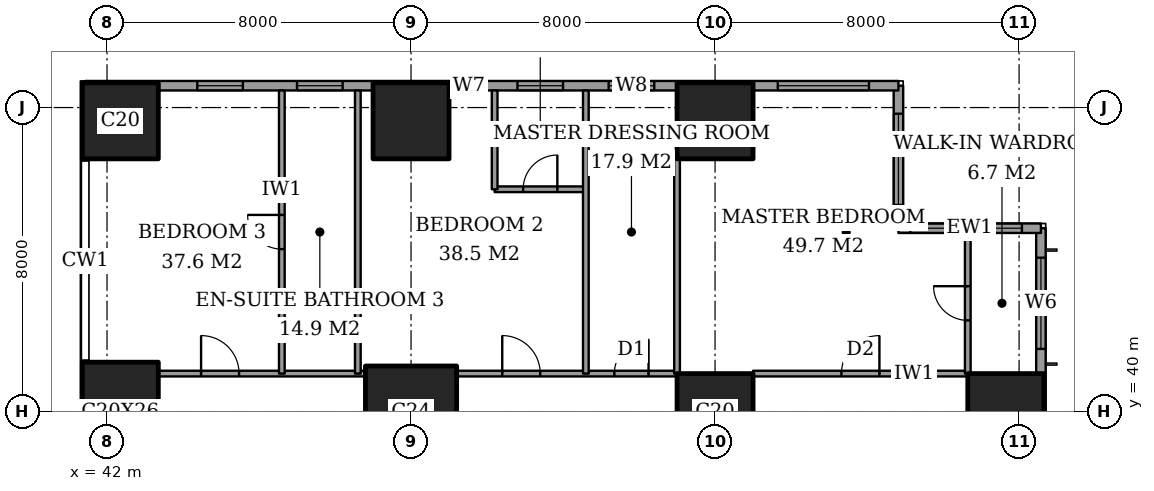
"""IFC4 building model, lengths in metres.
Left out: names, types, materials, properties, quantities, classifications, styles, units other than length and angle.
Written with IfcOpenShell. Run it as: python <this file> out.ifc"""

import sys

from ifc_helpers import new_model, si_unit, direction, frame, frame_2d, origin, origin_2d, place, context, subcontext, project, spatial, rectangle, extrude, element, fill, save


model = new_model("IFC4")
c1 = context("Model", 3, precision=1e-05, world=origin(), true_north=direction((0.0, 1.0)))
c2 = subcontext(c1, "Body", "Model", "MODEL_VIEW")
j1 = project(units=[si_unit("LENGTHUNIT", "METRE"), si_unit("PLANEANGLEUNIT", "RADIAN")], contexts=[c1])
p1 = place(None, origin())
s1 = spatial("IfcSite", under=j1, at=p1, CompositionType="ELEMENT")
p2 = place(p1, origin())
s2 = spatial("IfcBuilding", under=s1, at=p2, CompositionType="ELEMENT")
p3 = place(p2, frame((0.0, 0.0, 80.0)))
s3 = spatial("IfcBuildingStorey", under=s2, at=p3, CompositionType="ELEMENT", Elevation=80.0)
p4 = place(p3, frame((42.35, 40.0, 0.0), z_axis=(0.0, 0.0, 1.0), x_axis=(1.0, 0.0, 0.0)))
e1 = element("IfcColumn", 1, at=p4, inside=s3, PredefinedType="COLUMN", context=c2, shape_type="SweptSolid", body=[
    extrude(rectangle(XDim=2.0, YDim=2.6, at=origin_2d()), origin(), (0.0, 0.0, 1.0), 3.6),
])
p5 = place(p3, frame((42.35, 47.65, 0.0), z_axis=(0.0, 0.0, 1.0), x_axis=(1.0, 0.0, 0.0)))
e2 = element("IfcColumn", 2, at=p5, inside=s3, PredefinedType="COLUMN", context=c2, shape_type="SweptSolid", body=[
    extrude(rectangle(XDim=2.0, YDim=2.0, at=origin_2d()), origin(), (0.0, 0.0, 1.0), 3.6),
])
p6 = place(p3, frame((50.0, 40.0, 0.0), z_axis=(0.0, 0.0, 1.0), x_axis=(1.0, 0.0, 0.0)))
e3 = element("IfcColumn", 3, at=p6, inside=s3, PredefinedType="COLUMN", context=c2, shape_type="SweptSolid", body=[
    extrude(rectangle(XDim=2.4, YDim=2.4, at=origin_2d()), origin(), (0.0, 0.0, 1.0), 3.6),
])
for number, where, z_axis, x_axis in (
    (4, (50.0, 47.65, 0.0), (0.0, 0.0, 1.0), (1.0, 0.0, 0.0)),
    (5, (58.0, 40.0, 0.0), (0.0, 0.0, 1.0), (1.0, 0.0, 0.0)),
    (6, (58.0, 47.65, 0.0), (0.0, 0.0, 1.0), (1.0, 0.0, 0.0)),
    (7, (65.65, 40.0, 0.0), (0.0, 0.0, 1.0), (1.0, 0.0, 0.0)),
):
    element("IfcColumn", number, at=place(p3, frame(where, z_axis=z_axis, x_axis=x_axis)), inside=s3, PredefinedType="COLUMN", context=c2, shape_type="SweptSolid", body=[
        extrude(rectangle(XDim=2.0, YDim=2.0, at=origin_2d()), origin(), (0.0, 0.0, 1.0), 3.6),
    ])
p7 = place(p3, frame((66.575, 3.175, 0.0), z_axis=(0.0, 0.0, 1.0), x_axis=(0.0, 1.0, 0.0)))
e8 = element("IfcWall", 8, at=p7, inside=s3, PredefinedType="SOLIDWALL", context=c2, shape_type="SweptSolid", body=[
    extrude(rectangle(XDim=41.65, YDim=0.25, at=frame_2d((20.825, 0.0))), origin(), (0.0, 0.0, 1.0), 3.6),
])
p8 = place(p7, frame((0.775, 0.0, 0.6)))
e9 = element("IfcOpeningElement", 9, at=p8, cuts=e8, PredefinedType="OPENING", context=c2, shape_type="SweptSolid", body=[
    extrude(rectangle(XDim=2.4, YDim=2.0, at=frame_2d((1.2, 1.0))), frame((0.0, 0.135, 0.0), z_axis=(0.0, -1.0, 0.0), x_axis=(1.0, 0.0, 0.0)), (0.0, 0.0, 1.0), 0.27),
])
p9 = place(p7, frame((6.1, 0.0, 0.6)))
e10 = element("IfcOpeningElement", 10, at=p9, cuts=e8, PredefinedType="OPENING", context=c2, shape_type="SweptSolid", body=[
    extrude(rectangle(XDim=1.2, YDim=2.0, at=frame_2d((0.6, 1.0))), frame((0.0, 0.135, 0.0), z_axis=(0.0, -1.0, 0.0), x_axis=(1.0, 0.0, 0.0)), (0.0, 0.0, 1.0), 0.27),
])
p10 = place(p7, frame((8.275, 0.0, 0.6)))
e11 = element("IfcOpeningElement", 11, at=p10, cuts=e8, PredefinedType="OPENING", context=c2, shape_type="SweptSolid", body=[
    extrude(rectangle(XDim=2.4, YDim=2.0, at=frame_2d((1.2, 1.0))), frame((0.0, 0.135, 0.0), z_axis=(0.0, -1.0, 0.0), x_axis=(1.0, 0.0, 0.0)), (0.0, 0.0, 1.0), 0.27),
])
p11 = place(p7, frame((15.775, 0.0, 0.6)))
e12 = element("IfcOpeningElement", 12, at=p11, cuts=e8, PredefinedType="OPENING", context=c2, shape_type="SweptSolid", body=[
    extrude(rectangle(XDim=2.4, YDim=2.0, at=frame_2d((1.2, 1.0))), frame((0.0, 0.135, 0.0), z_axis=(0.0, -1.0, 0.0), x_axis=(1.0, 0.0, 0.0)), (0.0, 0.0, 1.0), 0.27),
])
p12 = place(p7, frame((23.475, 0.0, 0.6)))
e13 = element("IfcOpeningElement", 13, at=p12, cuts=e8, PredefinedType="OPENING", context=c2, shape_type="SweptSolid", body=[
    extrude(rectangle(XDim=2.4, YDim=2.0, at=frame_2d((1.2, 1.0))), frame((0.0, 0.135, 0.0), z_axis=(0.0, -1.0, 0.0), x_axis=(1.0, 0.0, 0.0)), (0.0, 0.0, 1.0), 0.27),
])
p13 = place(p7, frame((30.975, 0.0, 0.6)))
e14 = element("IfcOpeningElement", 14, at=p13, cuts=e8, PredefinedType="OPENING", context=c2, shape_type="SweptSolid", body=[
    extrude(rectangle(XDim=2.4, YDim=2.0, at=frame_2d((1.2, 1.0))), frame((0.0, 0.135, 0.0), z_axis=(0.0, -1.0, 0.0), x_axis=(1.0, 0.0, 0.0)), (0.0, 0.0, 1.0), 0.27),
])
p14 = place(p7, frame((34.5, 0.0, 0.6)))
e15 = element("IfcOpeningElement", 15, at=p14, cuts=e8, PredefinedType="OPENING", context=c2, shape_type="SweptSolid", body=[
    extrude(rectangle(XDim=1.2, YDim=2.0, at=frame_2d((0.6, 1.0))), frame((0.0, 0.135, 0.0), z_axis=(0.0, -1.0, 0.0), x_axis=(1.0, 0.0, 0.0)), (0.0, 0.0, 1.0), 0.27),
])
p15 = place(p7, frame((38.475, 0.0, 0.6)))
e16 = element("IfcOpeningElement", 16, at=p15, cuts=e8, PredefinedType="OPENING", context=c2, shape_type="SweptSolid", body=[
    extrude(rectangle(XDim=2.4, YDim=2.0, at=frame_2d((1.2, 1.0))), frame((0.0, 0.135, 0.0), z_axis=(0.0, -1.0, 0.0), x_axis=(1.0, 0.0, 0.0)), (0.0, 0.0, 1.0), 0.27),
])
p16 = place(p3, frame((66.575, 44.825, 0.0), z_axis=(0.0, 0.0, 1.0), x_axis=(-1.0, 0.0, 0.0)))
e17 = element("IfcWall", 17, at=p16, inside=s3, PredefinedType="SOLIDWALL", context=c2, shape_type="SweptSolid", body=[
    extrude(rectangle(XDim=3.75, YDim=0.25, at=frame_2d((1.875, 0.0))), origin(), (0.0, 0.0, 1.0), 3.6),
])
p17 = place(p16, frame((0.5, 0.0, 0.6)))
e18 = element("IfcOpeningElement", 18, at=p17, cuts=e17, PredefinedType="OPENING", context=c2, shape_type="SweptSolid", body=[
    extrude(rectangle(XDim=1.2, YDim=2.0, at=frame_2d((0.6, 1.0))), frame((0.0, 0.135, 0.0), z_axis=(0.0, -1.0, 0.0), x_axis=(1.0, 0.0, 0.0)), (0.0, 0.0, 1.0), 0.27),
])
p18 = place(p16, frame((2.238, 0.0, 0.6)))
e19 = element("IfcOpeningElement", 19, at=p18, cuts=e17, PredefinedType="OPENING", context=c2, shape_type="SweptSolid", body=[
    extrude(rectangle(XDim=1.2, YDim=2.0, at=frame_2d((0.6, 1.0))), frame((0.0, 0.135, 0.0), z_axis=(0.0, -1.0, 0.0), x_axis=(1.0, 0.0, 0.0)), (0.0, 0.0, 1.0), 0.27),
])
p19 = place(p3, frame((62.825, 44.825, 0.0), z_axis=(0.0, 0.0, 1.0), x_axis=(0.0, 1.0, 0.0)))
e20 = element("IfcWall", 20, at=p19, inside=s3, PredefinedType="SOLIDWALL", context=c2, shape_type="SweptSolid", body=[
    extrude(rectangle(XDim=3.75, YDim=0.25, at=frame_2d((1.875, 0.0))), origin(), (0.0, 0.0, 1.0), 3.6),
])
p20 = place(p19, frame((0.613, 0.0, 0.6)))
e21 = element("IfcOpeningElement", 21, at=p20, cuts=e20, PredefinedType="OPENING", context=c2, shape_type="SweptSolid", body=[
    extrude(rectangle(XDim=2.4, YDim=2.0, at=frame_2d((1.2, 1.0))), frame((0.0, 0.135, 0.0), z_axis=(0.0, -1.0, 0.0), x_axis=(1.0, 0.0, 0.0)), (0.0, 0.0, 1.0), 0.27),
])
p21 = place(p3, frame((62.825, 48.575, 0.0), z_axis=(0.0, 0.0, 1.0), x_axis=(-1.0, 0.0, 0.0)))
e22 = element("IfcWall", 22, at=p21, inside=s3, PredefinedType="SOLIDWALL", context=c2, shape_type="SweptSolid", body=[
    extrude(rectangle(XDim=21.4, YDim=0.25, at=frame_2d((10.7, 0.0))), origin(), (0.0, 0.0, 1.0), 3.6),
])
p22 = place(p21, frame((0.775, 0.0, 0.6)))
e23 = element("IfcOpeningElement", 23, at=p22, cuts=e22, PredefinedType="OPENING", context=c2, shape_type="SweptSolid", body=[
    extrude(rectangle(XDim=2.4, YDim=2.0, at=frame_2d((1.2, 1.0))), frame((0.0, 0.135, 0.0), z_axis=(0.0, -1.0, 0.0), x_axis=(1.0, 0.0, 0.0)), (0.0, 0.0, 1.0), 0.27),
])
p23 = place(p21, frame((6.425, 0.0, 0.6)))
e24 = element("IfcOpeningElement", 24, at=p23, cuts=e22, PredefinedType="OPENING", context=c2, shape_type="SweptSolid", body=[
    extrude(rectangle(XDim=1.2, YDim=2.0, at=frame_2d((0.6, 1.0))), frame((0.0, 0.135, 0.0), z_axis=(0.0, -1.0, 0.0), x_axis=(1.0, 0.0, 0.0)), (0.0, 0.0, 1.0), 0.27),
])
p24 = place(p21, frame((8.825, 0.0, 0.6)))
e25 = element("IfcOpeningElement", 25, at=p24, cuts=e22, PredefinedType="OPENING", context=c2, shape_type="SweptSolid", body=[
    extrude(rectangle(XDim=1.2, YDim=2.0, at=frame_2d((0.6, 1.0))), frame((0.0, 0.135, 0.0), z_axis=(0.0, -1.0, 0.0), x_axis=(1.0, 0.0, 0.0)), (0.0, 0.0, 1.0), 0.27),
])
p25 = place(p21, frame((11.0, 0.0, 0.6)))
e26 = element("IfcOpeningElement", 26, at=p25, cuts=e22, PredefinedType="OPENING", context=c2, shape_type="SweptSolid", body=[
    extrude(rectangle(XDim=0.6, YDim=2.0, at=frame_2d((0.3, 1.0))), frame((0.0, 0.135, 0.0), z_axis=(0.0, -1.0, 0.0), x_axis=(1.0, 0.0, 0.0)), (0.0, 0.0, 1.0), 0.27),
])
p26 = place(p21, frame((14.625, 0.0, 0.6)))
e27 = element("IfcOpeningElement", 27, at=p26, cuts=e22, PredefinedType="OPENING", context=c2, shape_type="SweptSolid", body=[
    extrude(rectangle(XDim=1.2, YDim=2.0, at=frame_2d((0.6, 1.0))), frame((0.0, 0.135, 0.0), z_axis=(0.0, -1.0, 0.0), x_axis=(1.0, 0.0, 0.0)), (0.0, 0.0, 1.0), 0.27),
])
p27 = place(p21, frame((17.25, 0.0, 0.6)))
e28 = element("IfcOpeningElement", 28, at=p27, cuts=e22, PredefinedType="OPENING", context=c2, shape_type="SweptSolid", body=[
    extrude(rectangle(XDim=1.2, YDim=2.0, at=frame_2d((0.6, 1.0))), frame((0.0, 0.135, 0.0), z_axis=(0.0, -1.0, 0.0), x_axis=(1.0, 0.0, 0.0)), (0.0, 0.0, 1.0), 0.27),
])
p28 = place(p3, frame((43.35, 41.0, 0.0), z_axis=(0.0, 0.0, 1.0), x_axis=(1.0, 0.0, 0.0)))
e29 = element("IfcWall", 29, at=p28, inside=s3, PredefinedType="PARTITIONING", context=c2, shape_type="SweptSolid", body=[
    extrude(rectangle(XDim=5.45, YDim=0.15, at=frame_2d((2.725, 0.0))), origin(), (0.0, 0.0, 1.0), 3.35),
])
p29 = place(p28, frame((1.125, 0.0, 0.0)))
e30 = element("IfcOpeningElement", 30, at=p29, cuts=e29, PredefinedType="OPENING", context=c2, shape_type="SweptSolid", body=[
    extrude(rectangle(XDim=1.0, YDim=2.1, at=frame_2d((0.5, 1.05))), frame((0.0, 0.085, 0.0), z_axis=(0.0, -1.0, 0.0), x_axis=(1.0, 0.0, 0.0)), (0.0, 0.0, 1.0), 0.17),
])
p30 = place(p3, frame((51.2, 41.0, 0.0), z_axis=(0.0, 0.0, 1.0), x_axis=(1.0, 0.0, 0.0)))
e31 = element("IfcWall", 31, at=p30, inside=s3, PredefinedType="PARTITIONING", context=c2, shape_type="SweptSolid", body=[
    extrude(rectangle(XDim=5.8, YDim=0.15, at=frame_2d((2.9, 0.0))), origin(), (0.0, 0.0, 1.0), 3.35),
])
p31 = place(p30, frame((4.15, 0.0, 0.0)))
e32 = element("IfcOpeningElement", 32, at=p31, cuts=e31, PredefinedType="OPENING", context=c2, shape_type="SweptSolid", body=[
    extrude(rectangle(XDim=0.9, YDim=2.1, at=frame_2d((0.45, 1.05))), frame((0.0, 0.085, 0.0), z_axis=(0.0, -1.0, 0.0), x_axis=(1.0, 0.0, 0.0)), (0.0, 0.0, 1.0), 0.17),
])
p32 = place(p30, frame((1.2, 0.0, 0.0)))
e33 = element("IfcOpeningElement", 33, at=p32, cuts=e31, PredefinedType="OPENING", context=c2, shape_type="SweptSolid", body=[
    extrude(rectangle(XDim=1.0, YDim=2.1, at=frame_2d((0.5, 1.05))), frame((0.0, 0.085, 0.0), z_axis=(0.0, -1.0, 0.0), x_axis=(1.0, 0.0, 0.0)), (0.0, 0.0, 1.0), 0.17),
])
p33 = place(p3, frame((59.0, 41.0, 0.0), z_axis=(0.0, 0.0, 1.0), x_axis=(1.0, 0.0, 0.0)))
e34 = element("IfcWall", 34, at=p33, inside=s3, PredefinedType="PARTITIONING", context=c2, shape_type="SweptSolid", body=[
    extrude(rectangle(XDim=5.65, YDim=0.15, at=frame_2d((2.825, 0.0))), origin(), (0.0, 0.0, 1.0), 3.35),
])
p34 = place(p33, frame((2.325, 0.0, 0.0)))
e35 = element("IfcOpeningElement", 35, at=p34, cuts=e34, PredefinedType="OPENING", context=c2, shape_type="SweptSolid", body=[
    extrude(rectangle(XDim=1.0, YDim=2.1, at=frame_2d((0.5, 1.05))), frame((0.0, 0.085, 0.0), z_axis=(0.0, -1.0, 0.0), x_axis=(1.0, 0.0, 0.0)), (0.0, 0.0, 1.0), 0.17),
])
p35 = place(p3, frame((52.2, 45.85, 0.0), z_axis=(0.0, 0.0, 1.0), x_axis=(1.0, 0.0, 0.0)))
e36 = element("IfcWall", 36, at=p35, inside=s3, PredefinedType="PARTITIONING", context=c2, shape_type="SweptSolid", body=[
    extrude(rectangle(XDim=2.4, YDim=0.15, at=frame_2d((1.2, 0.0))), origin(), (0.0, 0.0, 1.0), 3.35),
])
p36 = place(p35, frame((0.75, 0.0, 0.0)))
e37 = element("IfcOpeningElement", 37, at=p36, cuts=e36, PredefinedType="OPENING", context=c2, shape_type="SweptSolid", body=[
    extrude(rectangle(XDim=0.9, YDim=2.1, at=frame_2d((0.45, 1.05))), frame((0.0, 0.085, 0.0), z_axis=(0.0, -1.0, 0.0), x_axis=(1.0, 0.0, 0.0)), (0.0, 0.0, 1.0), 0.17),
])
p37 = place(p3, frame((46.6, 41.0, 0.0), z_axis=(0.0, 0.0, 1.0), x_axis=(0.0, 1.0, 0.0)))
e38 = element("IfcWall", 38, at=p37, inside=s3, PredefinedType="PARTITIONING", context=c2, shape_type="SweptSolid", body=[
    extrude(rectangle(XDim=7.45, YDim=0.15, at=frame_2d((3.725, 0.0))), origin(), (0.0, 0.0, 1.0), 3.35),
])
p38 = place(p37, frame((3.275, 0.0, 0.0)))
e39 = element("IfcOpeningElement", 39, at=p38, cuts=e38, PredefinedType="OPENING", context=c2, shape_type="SweptSolid", body=[
    extrude(rectangle(XDim=0.9, YDim=2.1, at=frame_2d((0.45, 1.05))), frame((0.0, 0.085, 0.0), z_axis=(0.0, -1.0, 0.0), x_axis=(1.0, 0.0, 0.0)), (0.0, 0.0, 1.0), 0.17),
])
p39 = place(p3, frame((48.6, 41.0, 0.0), z_axis=(0.0, 0.0, 1.0), x_axis=(0.0, 1.0, 0.0)))
e40 = element("IfcWall", 40, at=p39, inside=s3, PredefinedType="PARTITIONING", context=c2, shape_type="SweptSolid", body=[
    extrude(rectangle(XDim=7.45, YDim=0.15, at=frame_2d((3.725, 0.0))), origin(), (0.0, 0.0, 1.0), 3.35),
])
p40 = place(p3, frame((52.2, 45.85, 0.0), z_axis=(0.0, 0.0, 1.0), x_axis=(0.0, 1.0, 0.0)))
e41 = element("IfcWall", 41, at=p40, inside=s3, PredefinedType="PARTITIONING", context=c2, shape_type="SweptSolid", body=[
    extrude(rectangle(XDim=2.6, YDim=0.15, at=frame_2d((1.3, 0.0))), origin(), (0.0, 0.0, 1.0), 3.35),
])
p41 = place(p3, frame((54.6, 41.0, 0.0), z_axis=(0.0, 0.0, 1.0), x_axis=(0.0, 1.0, 0.0)))
e42 = element("IfcWall", 42, at=p41, inside=s3, PredefinedType="PARTITIONING", context=c2, shape_type="SweptSolid", body=[
    extrude(rectangle(XDim=7.45, YDim=0.15, at=frame_2d((3.725, 0.0))), origin(), (0.0, 0.0, 1.0), 3.35),
])
p42 = place(p3, frame((57.0, 41.0, 0.0), z_axis=(0.0, 0.0, 1.0), x_axis=(0.0, 1.0, 0.0)))
e43 = element("IfcWall", 43, at=p42, inside=s3, PredefinedType="PARTITIONING", context=c2, shape_type="SweptSolid", body=[
    extrude(rectangle(XDim=5.65, YDim=0.15, at=frame_2d((2.825, 0.0))), origin(), (0.0, 0.0, 1.0), 3.35),
])
p43 = place(p3, frame((64.65, 41.0, 0.0), z_axis=(0.0, 0.0, 1.0), x_axis=(0.0, 1.0, 0.0)))
e44 = element("IfcWall", 44, at=p43, inside=s3, PredefinedType="PARTITIONING", context=c2, shape_type="SweptSolid", body=[
    extrude(rectangle(XDim=3.7, YDim=0.15, at=frame_2d((1.85, 0.0))), origin(), (0.0, 0.0, 1.0), 3.35),
])
p44 = place(p43, frame((1.4, 0.0, 0.0)))
e45 = element("IfcOpeningElement", 45, at=p44, cuts=e44, PredefinedType="OPENING", context=c2, shape_type="SweptSolid", body=[
    extrude(rectangle(XDim=0.9, YDim=2.1, at=frame_2d((0.45, 1.05))), frame((0.0, 0.085, 0.0), z_axis=(0.0, -1.0, 0.0), x_axis=(1.0, 0.0, 0.0)), (0.0, 0.0, 1.0), 0.17),
])
p45 = place(p15, origin())
e46 = element("IfcWindow", 46, at=p45, inside=s3, PartitioningType="SINGLE_PANEL", PredefinedType="WINDOW", context=c2, shape_type="SweptSolid", body=[
    extrude(rectangle(XDim=2.4, YDim=2.0, at=frame_2d((1.2, 1.0))), frame((0.0, 0.03, 0.0), z_axis=(0.0, -1.0, 0.0), x_axis=(1.0, 0.0, 0.0)), (0.0, 0.0, 1.0), 0.06),
])
fill(e16, e46)
p46 = place(p17, origin())
e47 = element("IfcWindow", 47, at=p46, inside=s3, PartitioningType="SINGLE_PANEL", PredefinedType="WINDOW", context=c2, shape_type="SweptSolid", body=[
    extrude(rectangle(XDim=1.2, YDim=2.0, at=frame_2d((0.6, 1.0))), frame((0.0, 0.03, 0.0), z_axis=(0.0, -1.0, 0.0), x_axis=(1.0, 0.0, 0.0)), (0.0, 0.0, 1.0), 0.06),
])
fill(e18, e47)
p47 = place(p18, origin())
e48 = element("IfcWindow", 48, at=p47, inside=s3, PartitioningType="SINGLE_PANEL", PredefinedType="WINDOW", context=c2, shape_type="SweptSolid", body=[
    extrude(rectangle(XDim=1.2, YDim=2.0, at=frame_2d((0.6, 1.0))), frame((0.0, 0.03, 0.0), z_axis=(0.0, -1.0, 0.0), x_axis=(1.0, 0.0, 0.0)), (0.0, 0.0, 1.0), 0.06),
])
fill(e19, e48)
p48 = place(p20, origin())
e49 = element("IfcWindow", 49, at=p48, inside=s3, PartitioningType="SINGLE_PANEL", PredefinedType="WINDOW", context=c2, shape_type="SweptSolid", body=[
    extrude(rectangle(XDim=2.4, YDim=2.0, at=frame_2d((1.2, 1.0))), frame((0.0, 0.03, 0.0), z_axis=(0.0, -1.0, 0.0), x_axis=(1.0, 0.0, 0.0)), (0.0, 0.0, 1.0), 0.06),
])
fill(e21, e49)
p49 = place(p22, origin())
e50 = element("IfcWindow", 50, at=p49, inside=s3, PartitioningType="SINGLE_PANEL", PredefinedType="WINDOW", context=c2, shape_type="SweptSolid", body=[
    extrude(rectangle(XDim=2.4, YDim=2.0, at=frame_2d((1.2, 1.0))), frame((0.0, 0.03, 0.0), z_axis=(0.0, -1.0, 0.0), x_axis=(1.0, 0.0, 0.0)), (0.0, 0.0, 1.0), 0.06),
])
fill(e23, e50)
p50 = place(p23, origin())
e51 = element("IfcWindow", 51, at=p50, inside=s3, PartitioningType="SINGLE_PANEL", PredefinedType="WINDOW", context=c2, shape_type="SweptSolid", body=[
    extrude(rectangle(XDim=1.2, YDim=2.0, at=frame_2d((0.6, 1.0))), frame((0.0, 0.03, 0.0), z_axis=(0.0, -1.0, 0.0), x_axis=(1.0, 0.0, 0.0)), (0.0, 0.0, 1.0), 0.06),
])
fill(e24, e51)
p51 = place(p24, origin())
e52 = element("IfcWindow", 52, at=p51, inside=s3, PartitioningType="SINGLE_PANEL", PredefinedType="WINDOW", context=c2, shape_type="SweptSolid", body=[
    extrude(rectangle(XDim=1.2, YDim=2.0, at=frame_2d((0.6, 1.0))), frame((0.0, 0.03, 0.0), z_axis=(0.0, -1.0, 0.0), x_axis=(1.0, 0.0, 0.0)), (0.0, 0.0, 1.0), 0.06),
])
fill(e25, e52)
p52 = place(p25, origin())
e53 = element("IfcWindow", 53, at=p52, inside=s3, PartitioningType="SINGLE_PANEL", PredefinedType="WINDOW", context=c2, shape_type="SweptSolid", body=[
    extrude(rectangle(XDim=0.6, YDim=2.0, at=frame_2d((0.3, 1.0))), frame((0.0, 0.03, 0.0), z_axis=(0.0, -1.0, 0.0), x_axis=(1.0, 0.0, 0.0)), (0.0, 0.0, 1.0), 0.06),
])
fill(e26, e53)
p53 = place(p26, origin())
e54 = element("IfcWindow", 54, at=p53, inside=s3, PartitioningType="SINGLE_PANEL", PredefinedType="WINDOW", context=c2, shape_type="SweptSolid", body=[
    extrude(rectangle(XDim=1.2, YDim=2.0, at=frame_2d((0.6, 1.0))), frame((0.0, 0.03, 0.0), z_axis=(0.0, -1.0, 0.0), x_axis=(1.0, 0.0, 0.0)), (0.0, 0.0, 1.0), 0.06),
])
fill(e27, e54)
p54 = place(p27, origin())
e55 = element("IfcWindow", 55, at=p54, inside=s3, PartitioningType="SINGLE_PANEL", PredefinedType="WINDOW", context=c2, shape_type="SweptSolid", body=[
    extrude(rectangle(XDim=1.2, YDim=2.0, at=frame_2d((0.6, 1.0))), frame((0.0, 0.03, 0.0), z_axis=(0.0, -1.0, 0.0), x_axis=(1.0, 0.0, 0.0)), (0.0, 0.0, 1.0), 0.06),
])
fill(e28, e55)
p55 = place(p44, origin())
e56 = element("IfcDoor", 56, at=p55, inside=s3, OperationType="SINGLE_SWING_LEFT", PredefinedType="DOOR", context=c2, shape_type="SweptSolid", body=[
    extrude(rectangle(XDim=0.9, YDim=2.1, at=frame_2d((0.45, 1.05))), frame((0.0, 0.025, 0.0), z_axis=(0.0, -1.0, 0.0), x_axis=(1.0, 0.0, 0.0)), (0.0, 0.0, 1.0), 0.05),
])
fill(e45, e56)
p56 = place(p34, origin())
e57 = element("IfcDoor", 57, at=p56, inside=s3, OperationType="SINGLE_SWING_LEFT", PredefinedType="DOOR", context=c2, shape_type="SweptSolid", body=[
    extrude(rectangle(XDim=1.0, YDim=2.1, at=frame_2d((0.5, 1.05))), frame((0.0, 0.025, 0.0), z_axis=(0.0, -1.0, 0.0), x_axis=(1.0, 0.0, 0.0)), (0.0, 0.0, 1.0), 0.05),
])
fill(e35, e57)
p57 = place(p31, origin())
e58 = element("IfcDoor", 58, at=p57, inside=s3, OperationType="SINGLE_SWING_LEFT", PredefinedType="DOOR", context=c2, shape_type="SweptSolid", body=[
    extrude(rectangle(XDim=0.9, YDim=2.1, at=frame_2d((0.45, 1.05))), frame((0.0, 0.025, 0.0), z_axis=(0.0, -1.0, 0.0), x_axis=(1.0, 0.0, 0.0)), (0.0, 0.0, 1.0), 0.05),
])
fill(e32, e58)
p58 = place(p36, origin())
e59 = element("IfcDoor", 59, at=p58, inside=s3, OperationType="SINGLE_SWING_LEFT", PredefinedType="DOOR", context=c2, shape_type="SweptSolid", body=[
    extrude(rectangle(XDim=0.9, YDim=2.1, at=frame_2d((0.45, 1.05))), frame((0.0, 0.025, 0.0), z_axis=(0.0, -1.0, 0.0), x_axis=(1.0, 0.0, 0.0)), (0.0, 0.0, 1.0), 0.05),
])
fill(e37, e59)
p59 = place(p32, origin())
e60 = element("IfcDoor", 60, at=p59, inside=s3, OperationType="SINGLE_SWING_RIGHT", PredefinedType="DOOR", context=c2, shape_type="SweptSolid", body=[
    extrude(rectangle(XDim=1.0, YDim=2.1, at=frame_2d((0.5, 1.05))), frame((0.0, 0.025, 0.0), z_axis=(0.0, -1.0, 0.0), x_axis=(1.0, 0.0, 0.0)), (0.0, 0.0, 1.0), 0.05),
])
fill(e33, e60)
p60 = place(p38, origin())
e61 = element("IfcDoor", 61, at=p60, inside=s3, OperationType="SINGLE_SWING_LEFT", PredefinedType="DOOR", context=c2, shape_type="SweptSolid", body=[
    extrude(rectangle(XDim=0.9, YDim=2.1, at=frame_2d((0.45, 1.05))), frame((0.0, 0.025, 0.0), z_axis=(0.0, -1.0, 0.0), x_axis=(1.0, 0.0, 0.0)), (0.0, 0.0, 1.0), 0.05),
])
fill(e39, e61)
p61 = place(p29, origin())
e62 = element("IfcDoor", 62, at=p61, inside=s3, OperationType="SINGLE_SWING_RIGHT", PredefinedType="DOOR", context=c2, shape_type="SweptSolid", body=[
    extrude(rectangle(XDim=1.0, YDim=2.1, at=frame_2d((0.5, 1.05))), frame((0.0, 0.025, 0.0), z_axis=(0.0, -1.0, 0.0), x_axis=(1.0, 0.0, 0.0)), (0.0, 0.0, 1.0), 0.05),
])
fill(e30, e62)
save(model, sys.argv[1])
